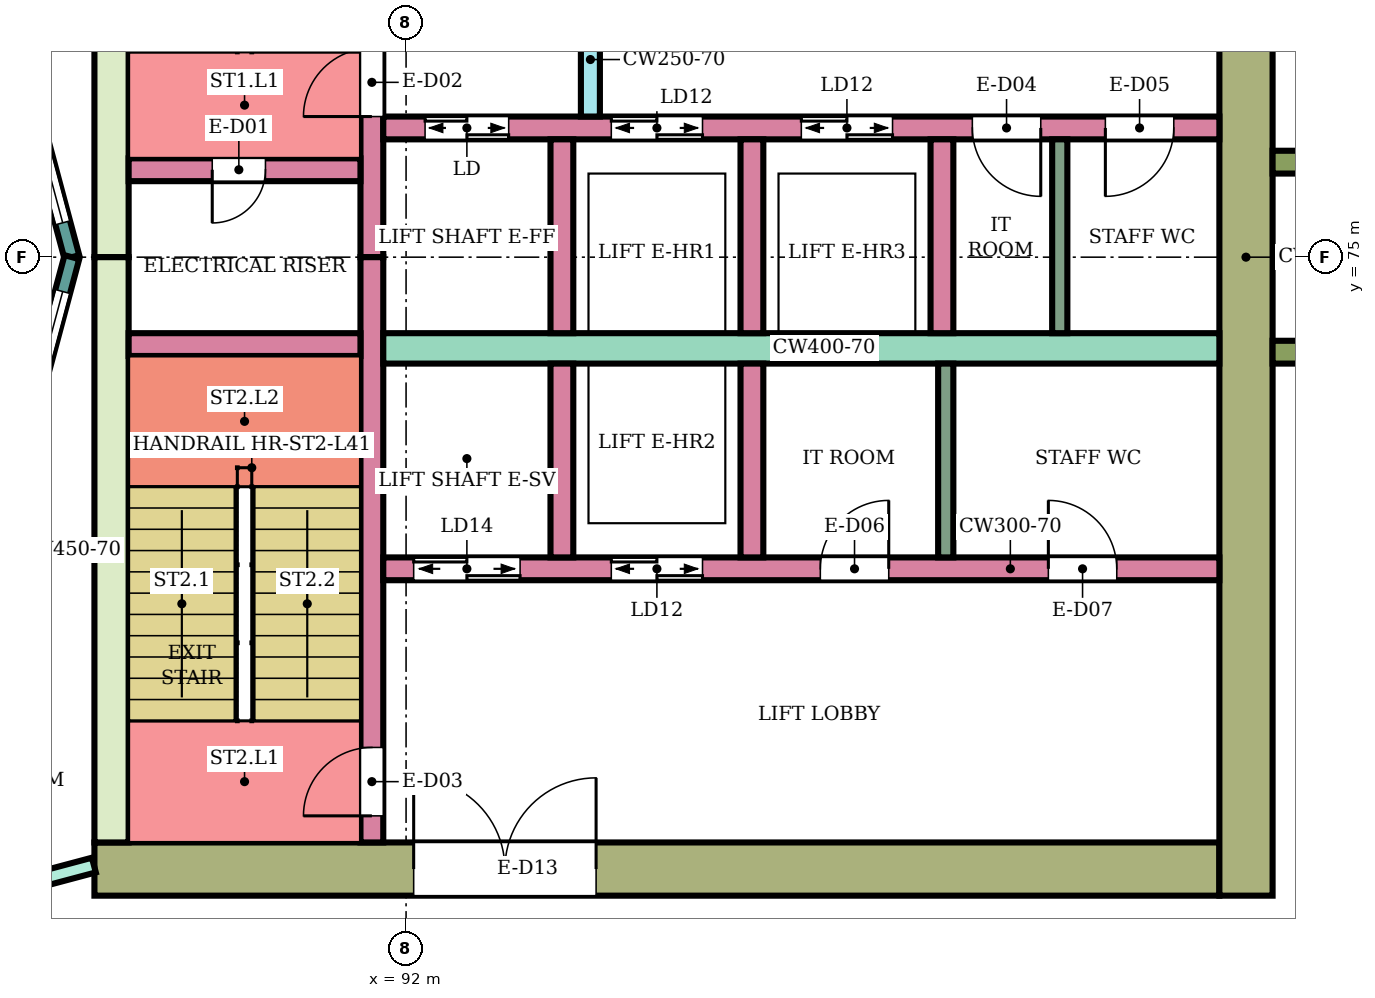
"""IFC4 building model, lengths in metres.
Left out: names, types, materials, properties, quantities, classifications, styles, units other than length and angle.
Written with IfcOpenShell. Run it as: python <this file> out.ifc"""

import sys

from ifc_helpers import new_model, si_unit, direction, frame, frame_2d, origin, place, context, subcontext, project, spatial, rectangle, extrude, element, fill, save


model = new_model("IFC4")
c1 = context("Model", 3, precision=1e-05, world=origin(), true_north=direction((0.0, 1.0)))
c2 = subcontext(c1, "Body", "Model", "MODEL_VIEW")
j1 = project(units=[si_unit("LENGTHUNIT", "METRE"), si_unit("PLANEANGLEUNIT", "RADIAN")], contexts=[c1])
p1 = place(None, origin())
s1 = spatial("IfcSite", under=j1, at=p1, CompositionType="ELEMENT")
p2 = place(p1, origin())
s2 = spatial("IfcBuilding", under=s1, at=p2, CompositionType="ELEMENT")
p3 = place(p2, frame((0.0, 0.0, 178.2)))
s3 = spatial("IfcBuildingStorey", under=s2, at=p3, CompositionType="ELEMENT", Elevation=178.2)
p4 = place(p3, frame((87.9, 66.95, 0.0), z_axis=(0.0, 0.0, 1.0), x_axis=(1.0, 0.0, 0.0)))
e1 = element("IfcWall", 1, at=p4, inside=s3, PredefinedType="SHEAR", context=c2, shape_type="SweptSolid", body=[
    extrude(rectangle(XDim=14.8, YDim=0.7, at=frame_2d((7.4, 0.0))), origin(), (0.0, 0.0, 1.0), 3.78),
])
p5 = place(p4, frame((4.2, 0.0, 0.0)))
e2 = element("IfcOpeningElement", 2, at=p5, cuts=e1, PredefinedType="OPENING", context=c2, shape_type="SweptSolid", body=[
    extrude(rectangle(XDim=2.4, YDim=2.4, at=frame_2d((1.2, 1.2))), frame((0.0, 0.36, 0.0), z_axis=(0.0, -1.0, 0.0), x_axis=(1.0, 0.0, 0.0)), (0.0, 0.0, 1.0), 0.72),
])
for number, where, z_axis, x_axis in (
    (3, (88.125, 75.0, 0.0), (0.0, 0.0, 1.0), (0.0, 1.0, 0.0)),
    (4, (88.125, 67.3, 0.0), (0.0, 0.0, 1.0), (0.0, 1.0, 0.0)),
):
    element("IfcWall", number, at=place(p3, frame(where, z_axis=z_axis, x_axis=x_axis)), inside=s3, PredefinedType="SHEAR", context=c2, shape_type="SweptSolid", body=[
        extrude(rectangle(XDim=7.7, YDim=0.45, at=frame_2d((3.85, 0.0))), origin(), (0.0, 0.0, 1.0), 3.78),
    ])
p6 = place(p3, frame((103.05, 66.6, 0.0), z_axis=(0.0, 0.0, 1.0), x_axis=(0.0, 1.0, 0.0)))
e5 = element("IfcWall", 5, at=p6, inside=s3, PredefinedType="SHEAR", context=c2, shape_type="SweptSolid", body=[
    extrude(rectangle(XDim=16.8, YDim=0.7, at=frame_2d((8.4, 0.0))), origin(), (0.0, 0.0, 1.0), 3.78),
])
p7 = place(p3, frame((91.55, 75.0, 0.0), z_axis=(0.0, 0.0, 1.0), x_axis=(0.0, 1.0, 0.0)))
e6 = element("IfcWall", 6, at=p7, inside=s3, PredefinedType="SHEAR", context=c2, shape_type="SweptSolid", body=[
    extrude(rectangle(XDim=7.7, YDim=0.3, at=frame_2d((3.85, 0.0))), origin(), (0.0, 0.0, 1.0), 3.78),
])
p8 = place(p7, frame((1.85, 0.0, 0.0)))
e7 = element("IfcOpeningElement", 7, at=p8, cuts=e6, PredefinedType="OPENING", context=c2, shape_type="SweptSolid", body=[
    extrude(rectangle(XDim=0.9, YDim=2.1, at=frame_2d((0.45, 1.05))), frame((0.0, 0.16, 0.0), z_axis=(0.0, -1.0, 0.0), x_axis=(1.0, 0.0, 0.0)), (0.0, 0.0, 1.0), 0.32),
])
p9 = place(p3, frame((91.55, 67.3, 0.0), z_axis=(0.0, 0.0, 1.0), x_axis=(0.0, 1.0, 0.0)))
e8 = element("IfcWall", 8, at=p9, inside=s3, PredefinedType="SHEAR", context=c2, shape_type="SweptSolid", body=[
    extrude(rectangle(XDim=7.7, YDim=0.3, at=frame_2d((3.85, 0.0))), origin(), (0.0, 0.0, 1.0), 3.78),
])
p10 = place(p9, frame((0.35, 0.0, 0.0)))
e9 = element("IfcOpeningElement", 9, at=p10, cuts=e8, PredefinedType="OPENING", context=c2, shape_type="SweptSolid", body=[
    extrude(rectangle(XDim=0.9, YDim=2.1, at=frame_2d((0.45, 1.05))), frame((0.0, 0.16, 0.0), z_axis=(0.0, -1.0, 0.0), x_axis=(1.0, 0.0, 0.0)), (0.0, 0.0, 1.0), 0.32),
])
p11 = place(p3, frame((88.35, 76.15, 0.0), z_axis=(0.0, 0.0, 1.0), x_axis=(1.0, 0.0, 0.0)))
e10 = element("IfcWall", 10, at=p11, inside=s3, PredefinedType="SHEAR", context=c2, shape_type="SweptSolid", body=[
    extrude(rectangle(XDim=3.05, YDim=0.3, at=frame_2d((1.525, 0.0))), origin(), (0.0, 0.0, 1.0), 3.78),
])
p12 = place(p11, frame((1.1, 0.0, 0.0)))
e11 = element("IfcOpeningElement", 11, at=p12, cuts=e10, PredefinedType="OPENING", context=c2, shape_type="SweptSolid", body=[
    extrude(rectangle(XDim=0.7, YDim=2.0, at=frame_2d((0.35, 1.0))), frame((0.0, 0.16, 0.0), z_axis=(0.0, -1.0, 0.0), x_axis=(1.0, 0.0, 0.0)), (0.0, 0.0, 1.0), 0.32),
])
p13 = place(p3, frame((88.35, 73.85, 0.0), z_axis=(0.0, 0.0, 1.0), x_axis=(1.0, 0.0, 0.0)))
e12 = element("IfcWall", 12, at=p13, inside=s3, PredefinedType="SHEAR", context=c2, shape_type="SweptSolid", body=[
    extrude(rectangle(XDim=3.05, YDim=0.3, at=frame_2d((1.525, 0.0))), origin(), (0.0, 0.0, 1.0), 3.78),
])
p14 = place(p3, frame((91.7, 76.7, 0.0), z_axis=(0.0, 0.0, 1.0), x_axis=(1.0, 0.0, 0.0)))
e13 = element("IfcWall", 13, at=p14, inside=s3, PredefinedType="SHEAR", context=c2, shape_type="SweptSolid", body=[
    extrude(rectangle(XDim=11.0, YDim=0.3, at=frame_2d((5.5, 0.0))), origin(), (0.0, 0.0, 1.0), 3.78),
])
p15 = place(p14, frame((0.55, 0.0, 0.0)))
e14 = element("IfcOpeningElement", 14, at=p15, cuts=e13, PredefinedType="OPENING", context=c2, shape_type="SweptSolid", body=[
    extrude(rectangle(XDim=1.1, YDim=2.1, at=frame_2d((0.55, 1.05))), frame((0.0, 0.16, 0.0), z_axis=(0.0, -1.0, 0.0), x_axis=(1.0, 0.0, 0.0)), (0.0, 0.0, 1.0), 0.32),
])
p16 = place(p14, frame((3.0, 0.0, 0.0)))
e15 = element("IfcOpeningElement", 15, at=p16, cuts=e13, PredefinedType="OPENING", context=c2, shape_type="SweptSolid", body=[
    extrude(rectangle(XDim=1.2, YDim=2.1, at=frame_2d((0.6, 1.05))), frame((0.0, 0.16, 0.0), z_axis=(0.0, -1.0, 0.0), x_axis=(1.0, 0.0, 0.0)), (0.0, 0.0, 1.0), 0.32),
])
p17 = place(p14, frame((5.5, 0.0, 0.0)))
e16 = element("IfcOpeningElement", 16, at=p17, cuts=e13, PredefinedType="OPENING", context=c2, shape_type="SweptSolid", body=[
    extrude(rectangle(XDim=1.2, YDim=2.1, at=frame_2d((0.6, 1.05))), frame((0.0, 0.16, 0.0), z_axis=(0.0, -1.0, 0.0), x_axis=(1.0, 0.0, 0.0)), (0.0, 0.0, 1.0), 0.32),
])
p18 = place(p14, frame((7.75, 0.0, 0.0)))
e17 = element("IfcOpeningElement", 17, at=p18, cuts=e13, PredefinedType="OPENING", context=c2, shape_type="SweptSolid", body=[
    extrude(rectangle(XDim=0.9, YDim=2.1, at=frame_2d((0.45, 1.05))), frame((0.0, 0.16, 0.0), z_axis=(0.0, -1.0, 0.0), x_axis=(1.0, 0.0, 0.0)), (0.0, 0.0, 1.0), 0.32),
])
p19 = place(p14, frame((9.5, 0.0, 0.0)))
e18 = element("IfcOpeningElement", 18, at=p19, cuts=e13, PredefinedType="OPENING", context=c2, shape_type="SweptSolid", body=[
    extrude(rectangle(XDim=0.9, YDim=2.1, at=frame_2d((0.45, 1.05))), frame((0.0, 0.16, 0.0), z_axis=(0.0, -1.0, 0.0), x_axis=(1.0, 0.0, 0.0)), (0.0, 0.0, 1.0), 0.32),
])
p20 = place(p3, frame((91.7, 73.8, 0.0), z_axis=(0.0, 0.0, 1.0), x_axis=(1.0, 0.0, 0.0)))
e19 = element("IfcWall", 19, at=p20, inside=s3, PredefinedType="SHEAR", context=c2, shape_type="SweptSolid", body=[
    extrude(rectangle(XDim=11.0, YDim=0.4, at=frame_2d((5.5, 0.0))), origin(), (0.0, 0.0, 1.0), 3.78),
])
p21 = place(p3, frame((91.7, 70.9, 0.0), z_axis=(0.0, 0.0, 1.0), x_axis=(1.0, 0.0, 0.0)))
e20 = element("IfcWall", 20, at=p21, inside=s3, PredefinedType="SHEAR", context=c2, shape_type="SweptSolid", body=[
    extrude(rectangle(XDim=11.0, YDim=0.3, at=frame_2d((5.5, 0.0))), origin(), (0.0, 0.0, 1.0), 3.78),
])
p22 = place(p21, frame((0.4, 0.0, 0.0)))
e21 = element("IfcOpeningElement", 21, at=p22, cuts=e20, PredefinedType="OPENING", context=c2, shape_type="SweptSolid", body=[
    extrude(rectangle(XDim=1.4, YDim=2.1, at=frame_2d((0.7, 1.05))), frame((0.0, 0.16, 0.0), z_axis=(0.0, -1.0, 0.0), x_axis=(1.0, 0.0, 0.0)), (0.0, 0.0, 1.0), 0.32),
])
p23 = place(p21, frame((3.0, 0.0, 0.0)))
e22 = element("IfcOpeningElement", 22, at=p23, cuts=e20, PredefinedType="OPENING", context=c2, shape_type="SweptSolid", body=[
    extrude(rectangle(XDim=1.2, YDim=2.1, at=frame_2d((0.6, 1.05))), frame((0.0, 0.16, 0.0), z_axis=(0.0, -1.0, 0.0), x_axis=(1.0, 0.0, 0.0)), (0.0, 0.0, 1.0), 0.32),
])
p24 = place(p21, frame((5.75, 0.0, 0.0)))
e23 = element("IfcOpeningElement", 23, at=p24, cuts=e20, PredefinedType="OPENING", context=c2, shape_type="SweptSolid", body=[
    extrude(rectangle(XDim=0.9, YDim=2.1, at=frame_2d((0.45, 1.05))), frame((0.0, 0.16, 0.0), z_axis=(0.0, -1.0, 0.0), x_axis=(1.0, 0.0, 0.0)), (0.0, 0.0, 1.0), 0.32),
])
p25 = place(p21, frame((8.75, 0.0, 0.0)))
e24 = element("IfcOpeningElement", 24, at=p25, cuts=e20, PredefinedType="OPENING", context=c2, shape_type="SweptSolid", body=[
    extrude(rectangle(XDim=0.9, YDim=2.1, at=frame_2d((0.45, 1.05))), frame((0.0, 0.16, 0.0), z_axis=(0.0, -1.0, 0.0), x_axis=(1.0, 0.0, 0.0)), (0.0, 0.0, 1.0), 0.32),
])
for number, where, z_axis, x_axis in (
    (25, (94.05, 74.0, 0.0), (0.0, 0.0, 1.0), (0.0, 1.0, 0.0)),
    (26, (96.55, 74.0, 0.0), (0.0, 0.0, 1.0), (0.0, 1.0, 0.0)),
    (27, (99.05, 74.0, 0.0), (0.0, 0.0, 1.0), (0.0, 1.0, 0.0)),
    (28, (94.05, 71.05, 0.0), (0.0, 0.0, 1.0), (0.0, 1.0, 0.0)),
    (29, (96.55, 71.05, 0.0), (0.0, 0.0, 1.0), (0.0, 1.0, 0.0)),
):
    element("IfcWall", number, at=place(p3, frame(where, z_axis=z_axis, x_axis=x_axis)), inside=s3, PredefinedType="SHEAR", context=c2, shape_type="SweptSolid", body=[
        extrude(rectangle(XDim=2.55, YDim=0.3, at=frame_2d((1.275, 0.0))), origin(), (0.0, 0.0, 1.0), 3.78),
    ])
p26 = place(p3, frame((94.425, 76.85, 0.0), z_axis=(0.0, 0.0, 1.0), x_axis=(0.0, 1.0, 0.0)))
e30 = element("IfcWall", 30, at=p26, inside=s3, PredefinedType="SHEAR", context=c2, shape_type="SweptSolid", body=[
    extrude(rectangle(XDim=1.5, YDim=0.25, at=frame_2d((0.75, 0.0))), origin(), (0.0, 0.0, 1.0), 3.78),
])
for number, where, z_axis, x_axis in (
    (31, (103.4, 73.75, 0.0), (0.0, 0.0, 1.0), (1.0, 0.0, 0.0)),
    (32, (103.4, 76.25, 0.0), (0.0, 0.0, 1.0), (1.0, 0.0, 0.0)),
):
    element("IfcWall", number, at=place(p3, frame(where, z_axis=z_axis, x_axis=x_axis)), inside=s3, PredefinedType="NOTDEFINED", context=c2, shape_type="SweptSolid", body=[
        extrude(rectangle(XDim=2.416, YDim=0.3, at=frame_2d((1.208, 0.0))), origin(), (0.0, 0.0, 1.0), 4.1),
    ])
p27 = place(p3, frame((87.604, 75.0, 0.0), z_axis=(0.0, 0.0, 1.0), x_axis=(-0.258789828301, 0.965933654434, 0.0)))
e33 = element("IfcWall", 33, at=p27, inside=s3, PredefinedType="NOTDEFINED", context=c2, shape_type="SweptSolid", body=[
    extrude(rectangle(XDim=3.936, YDim=0.2, at=frame_2d((1.968, 0.0))), origin(), (0.0, 0.0, 1.0), 4.1),
])
p28 = place(p27, frame((0.468, 0.0, 0.9)))
e34 = element("IfcOpeningElement", 34, at=p28, cuts=e33, PredefinedType="OPENING", context=c2, shape_type="SweptSolid", body=[
    extrude(rectangle(XDim=3.0, YDim=2.3, at=frame_2d((1.5, 1.15))), frame((0.0, 0.11, 0.0), z_axis=(0.0, -1.0, 0.0), x_axis=(1.0, 0.0, 0.0)), (0.0, 0.0, 1.0), 0.22),
])
p29 = place(p3, frame((86.585, 71.198, 0.0), z_axis=(0.0, 0.0, 1.0), x_axis=(0.258789828301, 0.965933654434, 0.0)))
e35 = element("IfcWall", 35, at=p29, inside=s3, PredefinedType="NOTDEFINED", context=c2, shape_type="SweptSolid", body=[
    extrude(rectangle(XDim=3.936, YDim=0.2, at=frame_2d((1.968, 0.0))), origin(), (0.0, 0.0, 1.0), 4.1),
])
p30 = place(p29, frame((0.468, 0.0, 0.9)))
e36 = element("IfcOpeningElement", 36, at=p30, cuts=e35, PredefinedType="OPENING", context=c2, shape_type="SweptSolid", body=[
    extrude(rectangle(XDim=3.0, YDim=2.3, at=frame_2d((1.5, 1.15))), frame((0.0, 0.11, 0.0), z_axis=(0.0, -1.0, 0.0), x_axis=(1.0, 0.0, 0.0)), (0.0, 0.0, 1.0), 0.22),
])
p31 = place(p3, frame((80.0, 64.898, 0.0), z_axis=(0.0, 0.0, 1.0), x_axis=(0.966237419782, 0.257653349704, 0.0)))
e37 = element("IfcWall", 37, at=p31, inside=s3, PredefinedType="PARTITIONING", context=c2, shape_type="SweptSolid", body=[
    extrude(rectangle(XDim=8.169, YDim=0.2, at=frame_2d((4.084, 0.0))), origin(), (0.0, 0.0, 1.0), 3.65),
])
p32 = place(p31, frame((6.428, 0.0, 0.0)))
e38 = element("IfcOpeningElement", 38, at=p32, cuts=e37, PredefinedType="OPENING", context=c2, shape_type="SweptSolid", body=[
    extrude(rectangle(XDim=0.9, YDim=2.1, at=frame_2d((0.45, 1.05))), frame((0.0, 0.11, 0.0), z_axis=(0.0, -1.0, 0.0), x_axis=(1.0, 0.0, 0.0)), (0.0, 0.0, 1.0), 0.22),
])
for number, where, z_axis, x_axis in (
    (39, (100.6, 74.0, 0.0), (0.0, 0.0, 1.0), (0.0, 1.0, 0.0)),
    (40, (99.1, 71.05, 0.0), (0.0, 0.0, 1.0), (0.0, 1.0, 0.0)),
):
    element("IfcWall", number, at=place(p3, frame(where, z_axis=z_axis, x_axis=x_axis)), inside=s3, PredefinedType="PARTITIONING", context=c2, shape_type="SweptSolid", body=[
        extrude(rectangle(XDim=2.55, YDim=0.2, at=frame_2d((1.275, 0.0))), origin(), (0.0, 0.0, 1.0), 3.78),
    ])
p33 = place(p28, origin())
e41 = element("IfcWindow", 41, at=p33, inside=s3, PartitioningType="SINGLE_PANEL", PredefinedType="WINDOW", context=c2, shape_type="SweptSolid", body=[
    extrude(rectangle(XDim=3.0, YDim=2.3, at=frame_2d((1.5, 1.15))), frame((0.0, 0.03, 0.0), z_axis=(0.0, -1.0, 0.0), x_axis=(1.0, 0.0, 0.0)), (0.0, 0.0, 1.0), 0.06),
])
fill(e34, e41)
p34 = place(p30, origin())
e42 = element("IfcWindow", 42, at=p34, inside=s3, PartitioningType="SINGLE_PANEL", PredefinedType="WINDOW", context=c2, shape_type="SweptSolid", body=[
    extrude(rectangle(XDim=3.0, YDim=2.3, at=frame_2d((1.5, 1.15))), frame((0.0, 0.03, 0.0), z_axis=(0.0, -1.0, 0.0), x_axis=(1.0, 0.0, 0.0)), (0.0, 0.0, 1.0), 0.06),
])
fill(e36, e42)
p35 = place(p12, frame((0.7, 0.0, 0.0), z_axis=(0.0, 0.0, 1.0), x_axis=(-1.0, 0.0, 0.0)))
e43 = element("IfcDoor", 43, at=p35, inside=s3, OperationType="SINGLE_SWING_RIGHT", PredefinedType="DOOR", context=c2, shape_type="SweptSolid", body=[
    extrude(rectangle(XDim=0.7, YDim=2.0, at=frame_2d((0.35, 1.0))), frame((0.0, 0.025, 0.0), z_axis=(0.0, -1.0, 0.0), x_axis=(1.0, 0.0, 0.0)), (0.0, 0.0, 1.0), 0.05),
])
fill(e11, e43)
p36 = place(p8, origin())
e44 = element("IfcDoor", 44, at=p36, inside=s3, OperationType="SINGLE_SWING_LEFT", PredefinedType="DOOR", context=c2, shape_type="SweptSolid", body=[
    extrude(rectangle(XDim=0.9, YDim=2.1, at=frame_2d((0.45, 1.05))), frame((0.0, 0.025, 0.0), z_axis=(0.0, -1.0, 0.0), x_axis=(1.0, 0.0, 0.0)), (0.0, 0.0, 1.0), 0.05),
])
fill(e7, e44)
p37 = place(p10, origin())
e45 = element("IfcDoor", 45, at=p37, inside=s3, OperationType="SINGLE_SWING_LEFT", PredefinedType="DOOR", context=c2, shape_type="SweptSolid", body=[
    extrude(rectangle(XDim=0.9, YDim=2.1, at=frame_2d((0.45, 1.05))), frame((0.0, 0.025, 0.0), z_axis=(0.0, -1.0, 0.0), x_axis=(1.0, 0.0, 0.0)), (0.0, 0.0, 1.0), 0.05),
])
fill(e9, e45)
p38 = place(p15, origin())
e46 = element("IfcDoor", 46, at=p38, inside=s3, OperationType="DOUBLE_DOOR_SLIDING", PredefinedType="DOOR", context=c2, shape_type="SweptSolid", body=[
    extrude(rectangle(XDim=1.1, YDim=2.1, at=frame_2d((0.55, 1.05))), frame((0.0, 0.025, 0.0), z_axis=(0.0, -1.0, 0.0), x_axis=(1.0, 0.0, 0.0)), (0.0, 0.0, 1.0), 0.05),
])
fill(e14, e46)
p39 = place(p16, origin())
e47 = element("IfcDoor", 47, at=p39, inside=s3, OperationType="DOUBLE_DOOR_SLIDING", PredefinedType="DOOR", context=c2, shape_type="SweptSolid", body=[
    extrude(rectangle(XDim=1.2, YDim=2.1, at=frame_2d((0.6, 1.05))), frame((0.0, 0.025, 0.0), z_axis=(0.0, -1.0, 0.0), x_axis=(1.0, 0.0, 0.0)), (0.0, 0.0, 1.0), 0.05),
])
fill(e15, e47)
p40 = place(p17, origin())
e48 = element("IfcDoor", 48, at=p40, inside=s3, OperationType="DOUBLE_DOOR_SLIDING", PredefinedType="DOOR", context=c2, shape_type="SweptSolid", body=[
    extrude(rectangle(XDim=1.2, YDim=2.1, at=frame_2d((0.6, 1.05))), frame((0.0, 0.025, 0.0), z_axis=(0.0, -1.0, 0.0), x_axis=(1.0, 0.0, 0.0)), (0.0, 0.0, 1.0), 0.05),
])
fill(e16, e48)
p41 = place(p18, frame((0.9, 0.0, 0.0), z_axis=(0.0, 0.0, 1.0), x_axis=(-1.0, 0.0, 0.0)))
e49 = element("IfcDoor", 49, at=p41, inside=s3, OperationType="SINGLE_SWING_LEFT", PredefinedType="DOOR", context=c2, shape_type="SweptSolid", body=[
    extrude(rectangle(XDim=0.9, YDim=2.1, at=frame_2d((0.45, 1.05))), frame((0.0, 0.025, 0.0), z_axis=(0.0, -1.0, 0.0), x_axis=(1.0, 0.0, 0.0)), (0.0, 0.0, 1.0), 0.05),
])
fill(e17, e49)
p42 = place(p19, frame((0.9, 0.0, 0.0), z_axis=(0.0, 0.0, 1.0), x_axis=(-1.0, 0.0, 0.0)))
e50 = element("IfcDoor", 50, at=p42, inside=s3, OperationType="SINGLE_SWING_RIGHT", PredefinedType="DOOR", context=c2, shape_type="SweptSolid", body=[
    extrude(rectangle(XDim=0.9, YDim=2.1, at=frame_2d((0.45, 1.05))), frame((0.0, 0.025, 0.0), z_axis=(0.0, -1.0, 0.0), x_axis=(1.0, 0.0, 0.0)), (0.0, 0.0, 1.0), 0.05),
])
fill(e18, e50)
p43 = place(p22, origin())
e51 = element("IfcDoor", 51, at=p43, inside=s3, OperationType="DOUBLE_DOOR_SLIDING", PredefinedType="DOOR", context=c2, shape_type="SweptSolid", body=[
    extrude(rectangle(XDim=1.4, YDim=2.1, at=frame_2d((0.7, 1.05))), frame((0.0, 0.025, 0.0), z_axis=(0.0, -1.0, 0.0), x_axis=(1.0, 0.0, 0.0)), (0.0, 0.0, 1.0), 0.05),
])
fill(e21, e51)
p44 = place(p23, origin())
e52 = element("IfcDoor", 52, at=p44, inside=s3, OperationType="DOUBLE_DOOR_SLIDING", PredefinedType="DOOR", context=c2, shape_type="SweptSolid", body=[
    extrude(rectangle(XDim=1.2, YDim=2.1, at=frame_2d((0.6, 1.05))), frame((0.0, 0.025, 0.0), z_axis=(0.0, -1.0, 0.0), x_axis=(1.0, 0.0, 0.0)), (0.0, 0.0, 1.0), 0.05),
])
fill(e22, e52)
p45 = place(p24, origin())
e53 = element("IfcDoor", 53, at=p45, inside=s3, OperationType="SINGLE_SWING_RIGHT", PredefinedType="DOOR", context=c2, shape_type="SweptSolid", body=[
    extrude(rectangle(XDim=0.9, YDim=2.1, at=frame_2d((0.45, 1.05))), frame((0.0, 0.025, 0.0), z_axis=(0.0, -1.0, 0.0), x_axis=(1.0, 0.0, 0.0)), (0.0, 0.0, 1.0), 0.05),
])
fill(e23, e53)
p46 = place(p25, origin())
e54 = element("IfcDoor", 54, at=p46, inside=s3, OperationType="SINGLE_SWING_LEFT", PredefinedType="DOOR", context=c2, shape_type="SweptSolid", body=[
    extrude(rectangle(XDim=0.9, YDim=2.1, at=frame_2d((0.45, 1.05))), frame((0.0, 0.025, 0.0), z_axis=(0.0, -1.0, 0.0), x_axis=(1.0, 0.0, 0.0)), (0.0, 0.0, 1.0), 0.05),
])
fill(e24, e54)
p47 = place(p5, origin())
e55 = element("IfcDoor", 55, at=p47, inside=s3, OperationType="DOUBLE_DOOR_SINGLE_SWING", PredefinedType="DOOR", context=c2, shape_type="SweptSolid", body=[
    extrude(rectangle(XDim=2.4, YDim=2.4, at=frame_2d((1.2, 1.2))), frame((0.0, 0.025, 0.0), z_axis=(0.0, -1.0, 0.0), x_axis=(1.0, 0.0, 0.0)), (0.0, 0.0, 1.0), 0.05),
])
fill(e2, e55)
save(model, sys.argv[1])
